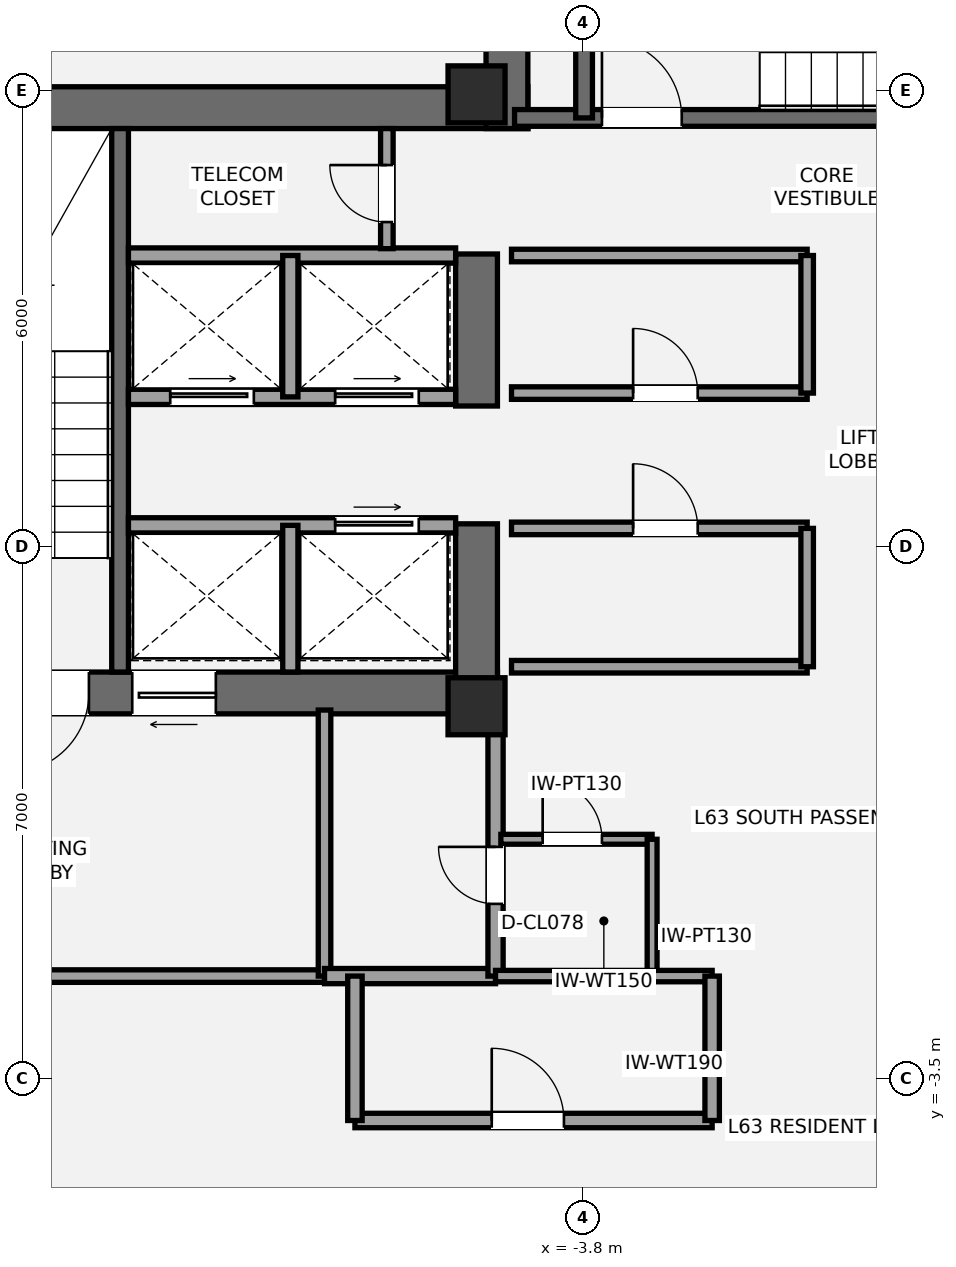
"""IFC4 building model, lengths in metres.
Left out: names, types, materials, properties, quantities, classifications, styles, units other than length and angle.
Written with IfcOpenShell. Run it as: python <this file> out.ifc"""

import sys

from ifc_helpers import new_model, si_unit, direction, frame, frame_2d, origin, origin_2d, place, context, subcontext, project, spatial, rectangle, extrude, element, fill, save


model = new_model("IFC4")
c1 = context("Model", 3, precision=1e-05, world=origin(), true_north=direction((0.0, 1.0)))
c2 = subcontext(c1, "Body", "Model", "MODEL_VIEW")
j1 = project(units=[si_unit("LENGTHUNIT", "METRE"), si_unit("PLANEANGLEUNIT", "RADIAN")], contexts=[c1])
p1 = place(None, origin())
s1 = spatial("IfcSite", under=j1, at=p1, CompositionType="ELEMENT")
p2 = place(p1, origin())
s2 = spatial("IfcBuilding", under=s1, at=p2, CompositionType="ELEMENT")
p3 = place(p2, frame((0.0, 0.0, 225.75)))
s3 = spatial("IfcBuildingStorey", under=s2, at=p3, CompositionType="ELEMENT", Elevation=225.75)
p4 = place(p3, frame((-13.7, 9.275, 0.0), z_axis=(0.0, 0.0, 1.0), x_axis=(1.0, 0.0, 0.0)))
e1 = element("IfcWall", 1, at=p4, inside=s3, PredefinedType="SHEAR", context=c2, shape_type="SweptSolid", body=[
    extrude(rectangle(XDim=9.175, YDim=0.55, at=frame_2d((4.587, 0.0))), origin(), (0.0, 0.0, 1.0), 3.15),
])
p5 = place(p3, frame((-4.925, 1.575, 0.0), z_axis=(0.0, 0.0, 1.0), x_axis=(-1.0, 0.0, 0.0)))
e2 = element("IfcWall", 2, at=p5, inside=s3, PredefinedType="SHEAR", context=c2, shape_type="SweptSolid", body=[
    extrude(rectangle(XDim=8.775, YDim=0.55, at=frame_2d((4.387, 0.0))), origin(), (0.0, 0.0, 1.0), 3.15),
])
p6 = place(p5, frame((5.375, 0.0, 0.0)))
e3 = element("IfcOpeningElement", 3, at=p6, cuts=e2, PredefinedType="OPENING", context=c2, shape_type="SweptSolid", body=[
    extrude(rectangle(XDim=1.05, YDim=2.15, at=frame_2d((0.525, 1.075))), frame((0.0, 0.285, 0.0), z_axis=(0.0, -1.0, 0.0), x_axis=(1.0, 0.0, 0.0)), (0.0, 0.0, 1.0), 0.57),
])
p7 = place(p5, frame((3.705, 0.0, 0.0)))
e4 = element("IfcOpeningElement", 4, at=p7, cuts=e2, PredefinedType="OPENING", context=c2, shape_type="SweptSolid", body=[
    extrude(rectangle(XDim=1.1, YDim=2.2, at=frame_2d((0.55, 1.1))), frame((0.0, 0.285, 0.0), z_axis=(0.0, -1.0, 0.0), x_axis=(1.0, 0.0, 0.0)), (0.0, 0.0, 1.0), 0.57),
])
p8 = place(p3, frame((-5.2, 1.3, 0.0), z_axis=(0.0, 0.0, 1.0), x_axis=(0.0, 1.0, 0.0)))
e5 = element("IfcWall", 5, at=p8, inside=s3, PredefinedType="SHEAR", context=c2, shape_type="SweptSolid", body=[
    extrude(rectangle(XDim=2.5, YDim=0.55, at=frame_2d((1.25, 0.0))), origin(), (0.0, 0.0, 1.0), 3.15),
])
p9 = place(p3, frame((-5.2, 5.35, 0.0), z_axis=(0.0, 0.0, 1.0), x_axis=(0.0, 1.0, 0.0)))
e6 = element("IfcWall", 6, at=p9, inside=s3, PredefinedType="SHEAR", context=c2, shape_type="SweptSolid", body=[
    extrude(rectangle(XDim=2.0, YDim=0.55, at=frame_2d((1.0, 0.0))), origin(), (0.0, 0.0, 1.0), 3.15),
])
p10 = place(p3, frame((-9.89, 1.85, 0.0), z_axis=(0.0, 0.0, 1.0), x_axis=(0.0, 1.0, 0.0)))
e7 = element("IfcWall", 7, at=p10, inside=s3, PredefinedType="SHEAR", context=c2, shape_type="SweptSolid", body=[
    extrude(rectangle(XDim=7.15, YDim=0.22, at=frame_2d((3.575, 0.0))), origin(), (0.0, 0.0, 1.0), 3.15),
])
p11 = place(p3, frame((-4.8, 9.0, 0.0), z_axis=(0.0, 0.0, 1.0), x_axis=(0.0, 1.0, 0.0)))
e8 = element("IfcWall", 8, at=p11, inside=s3, PredefinedType="SHEAR", context=c2, shape_type="SweptSolid", body=[
    extrude(rectangle(XDim=3.95, YDim=0.55, at=frame_2d((1.975, 0.0))), origin(), (0.0, 0.0, 1.0), 3.15),
])
p12 = place(p3, frame((-4.7, 9.14, 0.0), z_axis=(0.0, 0.0, 1.0), x_axis=(1.0, 0.0, 0.0)))
e9 = element("IfcWall", 9, at=p12, inside=s3, PredefinedType="SHEAR", context=c2, shape_type="SweptSolid", body=[
    extrude(rectangle(XDim=9.3, YDim=0.22, at=frame_2d((4.65, 0.0))), origin(), (0.0, 0.0, 1.0), 3.15),
])
p13 = place(p12, frame((1.15, 0.0, 0.0)))
e10 = element("IfcOpeningElement", 10, at=p13, cuts=e9, PredefinedType="OPENING", context=c2, shape_type="SweptSolid", body=[
    extrude(rectangle(XDim=1.05, YDim=2.15, at=frame_2d((0.525, 1.075))), frame((0.0, 0.12, 0.0), z_axis=(0.0, -1.0, 0.0), x_axis=(1.0, 0.0, 0.0)), (0.0, 0.0, 1.0), 0.24),
])
p14 = place(p3, frame((-3.785, 9.14, 0.0), z_axis=(0.0, 0.0, 1.0), x_axis=(0.0, 1.0, 0.0)))
e11 = element("IfcWall", 11, at=p14, inside=s3, PredefinedType="SHEAR", context=c2, shape_type="SweptSolid", body=[
    extrude(rectangle(XDim=3.26, YDim=0.22, at=frame_2d((1.63, 0.0))), origin(), (0.0, 0.0, 1.0), 3.15),
])
for number, where, z_axis, x_axis in (
    (12, (-5.2, 1.4, 0.0), (0.0, 0.0, 1.0), (1.0, 0.0, 0.0)),
    (13, (-5.2, 9.45, 0.0), (0.0, 0.0, 1.0), (1.0, 0.0, 0.0)),
):
    element("IfcColumn", number, at=place(p3, frame(where, z_axis=z_axis, x_axis=x_axis)), inside=s3, PredefinedType="PILASTER", context=c2, shape_type="SweptSolid", body=[
        extrude(rectangle(XDim=0.75, YDim=0.75, at=origin_2d()), origin(), (0.0, 0.0, 1.0), 3.15),
    ])
p15 = place(p3, frame((-13.45, -2.15, 0.0), z_axis=(0.0, 0.0, 1.0), x_axis=(1.0, 0.0, 0.0)))
e14 = element("IfcWall", 14, at=p15, inside=s3, PredefinedType="PARTITIONING", context=c2, shape_type="SweptSolid", body=[
    extrude(rectangle(XDim=6.25, YDim=0.165, at=frame_2d((3.125, 0.0))), origin(), (0.0, 0.0, 1.0), 2.423),
])
p16 = place(p3, frame((-7.2, -2.15, 0.0), z_axis=(0.0, 0.0, 1.0), x_axis=(0.0, 1.0, 0.0)))
e15 = element("IfcWall", 15, at=p16, inside=s3, PredefinedType="PARTITIONING", context=c2, shape_type="SweptSolid", body=[
    extrude(rectangle(XDim=3.5, YDim=0.165, at=frame_2d((1.75, 0.0))), origin(), (0.0, 0.0, 1.0), 2.423),
])
p17 = place(p3, frame((-7.2, -2.15, 0.0), z_axis=(0.0, 0.0, 1.0), x_axis=(1.0, 0.0, 0.0)))
e16 = element("IfcWall", 16, at=p17, inside=s3, PredefinedType="SOLIDWALL", context=c2, shape_type="SweptSolid", body=[
    extrude(rectangle(XDim=2.25, YDim=0.2, at=frame_2d((1.125, 0.0))), origin(), (0.0, 0.0, 1.0), 2.97),
])
p18 = place(p3, frame((-4.95, -2.15, 0.0), z_axis=(0.0, 0.0, 1.0), x_axis=(0.0, 1.0, 0.0)))
e17 = element("IfcWall", 17, at=p18, inside=s3, PredefinedType="SOLIDWALL", context=c2, shape_type="SweptSolid", body=[
    extrude(rectangle(XDim=3.5, YDim=0.2, at=frame_2d((1.75, 0.0))), origin(), (0.0, 0.0, 1.0), 2.423),
])
p19 = place(p18, frame((0.95, 0.0, 0.0)))
e18 = element("IfcOpeningElement", 18, at=p19, cuts=e17, PredefinedType="OPENING", context=c2, shape_type="SweptSolid", body=[
    extrude(rectangle(XDim=0.75, YDim=2.1, at=frame_2d((0.375, 1.05))), frame((0.0, 0.11, 0.0), z_axis=(0.0, -1.0, 0.0), x_axis=(1.0, 0.0, 0.0)), (0.0, 0.0, 1.0), 0.22),
])
p20 = place(p3, frame((-4.88, -0.35, 0.0), z_axis=(0.0, 0.0, 1.0), x_axis=(1.0, 0.0, 0.0)))
e19 = element("IfcWall", 19, at=p20, inside=s3, PredefinedType="PARTITIONING", context=c2, shape_type="SweptSolid", body=[
    extrude(rectangle(XDim=1.99, YDim=0.13, at=frame_2d((0.995, 0.0))), origin(), (0.0, 0.0, 1.0), 2.97),
])
p21 = place(p20, frame((0.55, 0.0, 0.0)))
e20 = element("IfcOpeningElement", 20, at=p21, cuts=e19, PredefinedType="OPENING", context=c2, shape_type="SweptSolid", body=[
    extrude(rectangle(XDim=0.78, YDim=2.1, at=frame_2d((0.39, 1.05))), frame((0.0, 0.075, 0.0), z_axis=(0.0, -1.0, 0.0), x_axis=(1.0, 0.0, 0.0)), (0.0, 0.0, 1.0), 0.15),
])
p22 = place(p3, frame((-2.89, -2.15, 0.0), z_axis=(0.0, 0.0, 1.0), x_axis=(0.0, 1.0, 0.0)))
e21 = element("IfcWall", 21, at=p22, inside=s3, PredefinedType="PARTITIONING", context=c2, shape_type="SweptSolid", body=[
    extrude(rectangle(XDim=1.8, YDim=0.13, at=frame_2d((0.9, 0.0))), origin(), (0.0, 0.0, 1.0), 2.423),
])
p23 = place(p3, frame((-9.78, 3.78, 0.0), z_axis=(0.0, 0.0, 1.0), x_axis=(1.0, 0.0, 0.0)))
e22 = element("IfcWall", 22, at=p23, inside=s3, PredefinedType="SOLIDWALL", context=c2, shape_type="SweptSolid", body=[
    extrude(rectangle(XDim=4.305, YDim=0.2, at=frame_2d((2.152, 0.0))), origin(), (0.0, 0.0, 1.0), 2.97),
])
p24 = place(p23, frame((2.72, 0.0, 0.0)))
e23 = element("IfcOpeningElement", 23, at=p24, cuts=e22, PredefinedType="OPENING", context=c2, shape_type="SweptSolid", body=[
    extrude(rectangle(XDim=1.1, YDim=2.2, at=frame_2d((0.55, 1.1))), frame((0.0, 0.11, 0.0), z_axis=(0.0, -1.0, 0.0), x_axis=(1.0, 0.0, 0.0)), (0.0, 0.0, 1.0), 0.22),
])
p25 = place(p3, frame((-7.65, 1.85, 0.0), z_axis=(0.0, 0.0, 1.0), x_axis=(0.0, 1.0, 0.0)))
e24 = element("IfcWall", 24, at=p25, inside=s3, PredefinedType="SOLIDWALL", context=c2, shape_type="SweptSolid", body=[
    extrude(rectangle(XDim=1.93, YDim=0.2, at=frame_2d((0.965, 0.0))), origin(), (0.0, 0.0, 1.0), 2.97),
])
p26 = place(p3, frame((-9.78, 5.47, 0.0), z_axis=(0.0, 0.0, 1.0), x_axis=(1.0, 0.0, 0.0)))
e25 = element("IfcWall", 25, at=p26, inside=s3, PredefinedType="SOLIDWALL", context=c2, shape_type="SweptSolid", body=[
    extrude(rectangle(XDim=4.305, YDim=0.2, at=frame_2d((2.152, 0.0))), origin(), (0.0, 0.0, 1.0), 2.97),
])
p27 = place(p26, frame((0.55, 0.0, 0.0)))
e26 = element("IfcOpeningElement", 26, at=p27, cuts=e25, PredefinedType="OPENING", context=c2, shape_type="SweptSolid", body=[
    extrude(rectangle(XDim=1.1, YDim=2.2, at=frame_2d((0.55, 1.1))), frame((0.0, 0.11, 0.0), z_axis=(0.0, -1.0, 0.0), x_axis=(1.0, 0.0, 0.0)), (0.0, 0.0, 1.0), 0.22),
])
p28 = place(p26, frame((2.72, 0.0, 0.0)))
e27 = element("IfcOpeningElement", 27, at=p28, cuts=e25, PredefinedType="OPENING", context=c2, shape_type="SweptSolid", body=[
    extrude(rectangle(XDim=1.1, YDim=2.2, at=frame_2d((0.55, 1.1))), frame((0.0, 0.11, 0.0), z_axis=(0.0, -1.0, 0.0), x_axis=(1.0, 0.0, 0.0)), (0.0, 0.0, 1.0), 0.22),
])
p29 = place(p3, frame((-9.78, 7.33, 0.0), z_axis=(0.0, 0.0, 1.0), x_axis=(1.0, 0.0, 0.0)))
e28 = element("IfcWall", 28, at=p29, inside=s3, PredefinedType="SOLIDWALL", context=c2, shape_type="SweptSolid", body=[
    extrude(rectangle(XDim=4.305, YDim=0.2, at=frame_2d((2.152, 0.0))), origin(), (0.0, 0.0, 1.0), 2.97),
])
p30 = place(p3, frame((-7.65, 5.47, 0.0), z_axis=(0.0, 0.0, 1.0), x_axis=(0.0, 1.0, 0.0)))
e29 = element("IfcWall", 29, at=p30, inside=s3, PredefinedType="SOLIDWALL", context=c2, shape_type="SweptSolid", body=[
    extrude(rectangle(XDim=1.86, YDim=0.2, at=frame_2d((0.93, 0.0))), origin(), (0.0, 0.0, 1.0), 2.97),
])
p31 = place(p3, frame((-4.74, 1.92, 0.0), z_axis=(0.0, 0.0, 1.0), x_axis=(1.0, 0.0, 0.0)))
e30 = element("IfcWall", 30, at=p31, inside=s3, PredefinedType="PARTITIONING", context=c2, shape_type="SweptSolid", body=[
    extrude(rectangle(XDim=3.89, YDim=0.165, at=frame_2d((1.945, 0.0))), origin(), (0.0, 0.0, 1.0), 2.11),
])
p32 = place(p3, frame((-4.74, 3.74, 0.0), z_axis=(0.0, 0.0, 1.0), x_axis=(1.0, 0.0, 0.0)))
e31 = element("IfcWall", 31, at=p32, inside=s3, PredefinedType="PARTITIONING", context=c2, shape_type="SweptSolid", body=[
    extrude(rectangle(XDim=3.89, YDim=0.165, at=frame_2d((1.945, 0.0))), origin(), (0.0, 0.0, 1.0), 2.97),
])
p33 = place(p32, frame((1.6, 0.0, 0.0)))
e32 = element("IfcOpeningElement", 32, at=p33, cuts=e31, PredefinedType="OPENING", context=c2, shape_type="SweptSolid", body=[
    extrude(rectangle(XDim=0.85, YDim=2.1, at=frame_2d((0.425, 1.05))), frame((0.0, 0.093, 0.0), z_axis=(0.0, -1.0, 0.0), x_axis=(1.0, 0.0, 0.0)), (0.0, 0.0, 1.0), 0.185),
])
p34 = place(p3, frame((-0.85, 1.92, 0.0), z_axis=(0.0, 0.0, 1.0), x_axis=(0.0, 1.0, 0.0)))
e33 = element("IfcWall", 33, at=p34, inside=s3, PredefinedType="PARTITIONING", context=c2, shape_type="SweptSolid", body=[
    extrude(rectangle(XDim=1.82, YDim=0.165, at=frame_2d((0.91, 0.0))), origin(), (0.0, 0.0, 1.0), 2.97),
])
p35 = place(p3, frame((-4.74, 5.52, 0.0), z_axis=(0.0, 0.0, 1.0), x_axis=(1.0, 0.0, 0.0)))
e34 = element("IfcWall", 34, at=p35, inside=s3, PredefinedType="PARTITIONING", context=c2, shape_type="SweptSolid", body=[
    extrude(rectangle(XDim=3.89, YDim=0.165, at=frame_2d((1.945, 0.0))), origin(), (0.0, 0.0, 1.0), 2.97),
])
p36 = place(p35, frame((1.6, 0.0, 0.0)))
e35 = element("IfcOpeningElement", 35, at=p36, cuts=e34, PredefinedType="OPENING", context=c2, shape_type="SweptSolid", body=[
    extrude(rectangle(XDim=0.85, YDim=2.1, at=frame_2d((0.425, 1.05))), frame((0.0, 0.093, 0.0), z_axis=(0.0, -1.0, 0.0), x_axis=(1.0, 0.0, 0.0)), (0.0, 0.0, 1.0), 0.185),
])
p37 = place(p3, frame((-4.74, 7.33, 0.0), z_axis=(0.0, 0.0, 1.0), x_axis=(1.0, 0.0, 0.0)))
e36 = element("IfcWall", 36, at=p37, inside=s3, PredefinedType="PARTITIONING", context=c2, shape_type="SweptSolid", body=[
    extrude(rectangle(XDim=3.89, YDim=0.165, at=frame_2d((1.945, 0.0))), origin(), (0.0, 0.0, 1.0), 2.97),
])
p38 = place(p3, frame((-0.85, 5.52, 0.0), z_axis=(0.0, 0.0, 1.0), x_axis=(0.0, 1.0, 0.0)))
e37 = element("IfcWall", 37, at=p38, inside=s3, PredefinedType="PARTITIONING", context=c2, shape_type="SweptSolid", body=[
    extrude(rectangle(XDim=1.81, YDim=0.165, at=frame_2d((0.905, 0.0))), origin(), (0.0, 0.0, 1.0), 2.97),
])
p39 = place(p3, frame((-6.38, 7.42, 0.0), z_axis=(0.0, 0.0, 1.0), x_axis=(0.0, 1.0, 0.0)))
e38 = element("IfcWall", 38, at=p39, inside=s3, PredefinedType="PARTITIONING", context=c2, shape_type="SweptSolid", body=[
    extrude(rectangle(XDim=1.58, YDim=0.165, at=frame_2d((0.79, 0.0))), origin(), (0.0, 0.0, 1.0), 2.97),
])
p40 = place(p39, frame((0.35, 0.0, 0.0)))
e39 = element("IfcOpeningElement", 39, at=p40, cuts=e38, PredefinedType="OPENING", context=c2, shape_type="SweptSolid", body=[
    extrude(rectangle(XDim=0.75, YDim=2.1, at=frame_2d((0.375, 1.05))), frame((0.0, 0.093, 0.0), z_axis=(0.0, -1.0, 0.0), x_axis=(1.0, 0.0, 0.0)), (0.0, 0.0, 1.0), 0.185),
])
p41 = place(p3, frame((-6.8, -4.05, 0.0), z_axis=(0.0, 0.0, 1.0), x_axis=(1.0, 0.0, 0.0)))
e40 = element("IfcWall", 40, at=p41, inside=s3, PredefinedType="PLUMBINGWALL", context=c2, shape_type="SweptSolid", body=[
    extrude(rectangle(XDim=4.7, YDim=0.19, at=frame_2d((2.35, 0.0))), origin(), (0.0, 0.0, 1.0), 2.423),
])
p42 = place(p41, frame((1.8, 0.0, 0.0)))
e41 = element("IfcOpeningElement", 41, at=p42, cuts=e40, PredefinedType="OPENING", context=c2, shape_type="SweptSolid", body=[
    extrude(rectangle(XDim=0.95, YDim=2.15, at=frame_2d((0.475, 1.075))), frame((0.0, 0.105, 0.0), z_axis=(0.0, -1.0, 0.0), x_axis=(1.0, 0.0, 0.0)), (0.0, 0.0, 1.0), 0.21),
])
p43 = place(p3, frame((-4.95, -2.15, 0.0), z_axis=(0.0, 0.0, 1.0), x_axis=(1.0, 0.0, 0.0)))
e42 = element("IfcWall", 42, at=p43, inside=s3, PredefinedType="PLUMBINGWALL", context=c2, shape_type="SweptSolid", body=[
    extrude(rectangle(XDim=2.85, YDim=0.15, at=frame_2d((1.425, 0.0))), origin(), (0.0, 0.0, 1.0), 2.97),
])
for number, where, z_axis, x_axis in (
    (43, (-6.8, -4.05, 0.0), (0.0, 0.0, 1.0), (0.0, 1.0, 0.0)),
    (44, (-2.1, -4.05, 0.0), (0.0, 0.0, 1.0), (0.0, 1.0, 0.0)),
):
    element("IfcWall", number, at=place(p3, frame(where, z_axis=z_axis, x_axis=x_axis)), inside=s3, PredefinedType="PLUMBINGWALL", context=c2, shape_type="SweptSolid", body=[
        extrude(rectangle(XDim=1.9, YDim=0.19, at=frame_2d((0.95, 0.0))), origin(), (0.0, 0.0, 1.0), 2.423),
    ])
p44 = place(p6, origin())
e45 = element("IfcDoor", 45, at=p44, inside=s3, OperationType="SINGLE_SWING_RIGHT", PredefinedType="DOOR", context=c2, shape_type="SweptSolid", body=[
    extrude(rectangle(XDim=1.05, YDim=2.15, at=frame_2d((0.525, 1.075))), frame((0.0, 0.025, 0.0), z_axis=(0.0, -1.0, 0.0), x_axis=(1.0, 0.0, 0.0)), (0.0, 0.0, 1.0), 0.05),
])
fill(e3, e45)
p45 = place(p13, origin())
e46 = element("IfcDoor", 46, at=p45, inside=s3, OperationType="SINGLE_SWING_LEFT", PredefinedType="DOOR", context=c2, shape_type="SweptSolid", body=[
    extrude(rectangle(XDim=1.05, YDim=2.15, at=frame_2d((0.525, 1.075))), frame((0.0, 0.025, 0.0), z_axis=(0.0, -1.0, 0.0), x_axis=(1.0, 0.0, 0.0)), (0.0, 0.0, 1.0), 0.05),
])
fill(e10, e46)
p46 = place(p19, origin())
e47 = element("IfcDoor", 47, at=p46, inside=s3, OperationType="SINGLE_SWING_RIGHT", PredefinedType="DOOR", context=c2, shape_type="SweptSolid", body=[
    extrude(rectangle(XDim=0.75, YDim=2.1, at=frame_2d((0.375, 1.05))), frame((0.0, 0.025, 0.0), z_axis=(0.0, -1.0, 0.0), x_axis=(1.0, 0.0, 0.0)), (0.0, 0.0, 1.0), 0.05),
])
fill(e18, e47)
p47 = place(p21, origin())
e48 = element("IfcDoor", 48, at=p47, inside=s3, OperationType="SINGLE_SWING_LEFT", PredefinedType="DOOR", context=c2, shape_type="SweptSolid", body=[
    extrude(rectangle(XDim=0.78, YDim=2.1, at=frame_2d((0.39, 1.05))), frame((0.0, 0.025, 0.0), z_axis=(0.0, -1.0, 0.0), x_axis=(1.0, 0.0, 0.0)), (0.0, 0.0, 1.0), 0.05),
])
fill(e20, e48)
p48 = place(p7, origin())
e49 = element("IfcDoor", 49, at=p48, inside=s3, OperationType="SLIDING_TO_LEFT", PredefinedType="DOOR", context=c2, shape_type="SweptSolid", body=[
    extrude(rectangle(XDim=1.1, YDim=2.2, at=frame_2d((0.55, 1.1))), frame((0.0, 0.025, 0.0), z_axis=(0.0, -1.0, 0.0), x_axis=(1.0, 0.0, 0.0)), (0.0, 0.0, 1.0), 0.05),
])
fill(e4, e49)
p49 = place(p27, origin())
e50 = element("IfcDoor", 50, at=p49, inside=s3, OperationType="SLIDING_TO_LEFT", PredefinedType="DOOR", context=c2, shape_type="SweptSolid", body=[
    extrude(rectangle(XDim=1.1, YDim=2.2, at=frame_2d((0.55, 1.1))), frame((0.0, 0.025, 0.0), z_axis=(0.0, -1.0, 0.0), x_axis=(1.0, 0.0, 0.0)), (0.0, 0.0, 1.0), 0.05),
])
fill(e26, e50)
p50 = place(p28, origin())
e51 = element("IfcDoor", 51, at=p50, inside=s3, OperationType="SLIDING_TO_LEFT", PredefinedType="DOOR", context=c2, shape_type="SweptSolid", body=[
    extrude(rectangle(XDim=1.1, YDim=2.2, at=frame_2d((0.55, 1.1))), frame((0.0, 0.025, 0.0), z_axis=(0.0, -1.0, 0.0), x_axis=(1.0, 0.0, 0.0)), (0.0, 0.0, 1.0), 0.05),
])
fill(e27, e51)
p51 = place(p24, origin())
e52 = element("IfcDoor", 52, at=p51, inside=s3, OperationType="SLIDING_TO_LEFT", PredefinedType="DOOR", context=c2, shape_type="SweptSolid", body=[
    extrude(rectangle(XDim=1.1, YDim=2.2, at=frame_2d((0.55, 1.1))), frame((0.0, 0.025, 0.0), z_axis=(0.0, -1.0, 0.0), x_axis=(1.0, 0.0, 0.0)), (0.0, 0.0, 1.0), 0.05),
])
fill(e23, e52)
p52 = place(p33, origin())
e53 = element("IfcDoor", 53, at=p52, inside=s3, OperationType="SINGLE_SWING_LEFT", PredefinedType="DOOR", context=c2, shape_type="SweptSolid", body=[
    extrude(rectangle(XDim=0.85, YDim=2.1, at=frame_2d((0.425, 1.05))), frame((0.0, 0.025, 0.0), z_axis=(0.0, -1.0, 0.0), x_axis=(1.0, 0.0, 0.0)), (0.0, 0.0, 1.0), 0.05),
])
fill(e32, e53)
p53 = place(p36, origin())
e54 = element("IfcDoor", 54, at=p53, inside=s3, OperationType="SINGLE_SWING_LEFT", PredefinedType="DOOR", context=c2, shape_type="SweptSolid", body=[
    extrude(rectangle(XDim=0.85, YDim=2.1, at=frame_2d((0.425, 1.05))), frame((0.0, 0.025, 0.0), z_axis=(0.0, -1.0, 0.0), x_axis=(1.0, 0.0, 0.0)), (0.0, 0.0, 1.0), 0.05),
])
fill(e35, e54)
p54 = place(p40, origin())
e55 = element("IfcDoor", 55, at=p54, inside=s3, OperationType="SINGLE_SWING_RIGHT", PredefinedType="DOOR", context=c2, shape_type="SweptSolid", body=[
    extrude(rectangle(XDim=0.75, YDim=2.1, at=frame_2d((0.375, 1.05))), frame((0.0, 0.025, 0.0), z_axis=(0.0, -1.0, 0.0), x_axis=(1.0, 0.0, 0.0)), (0.0, 0.0, 1.0), 0.05),
])
fill(e39, e55)
p55 = place(p42, origin())
e56 = element("IfcDoor", 56, at=p55, inside=s3, OperationType="SINGLE_SWING_LEFT", PredefinedType="DOOR", context=c2, shape_type="SweptSolid", body=[
    extrude(rectangle(XDim=0.95, YDim=2.15, at=frame_2d((0.475, 1.075))), frame((0.0, 0.025, 0.0), z_axis=(0.0, -1.0, 0.0), x_axis=(1.0, 0.0, 0.0)), (0.0, 0.0, 1.0), 0.05),
])
fill(e41, e56)
save(model, sys.argv[1])
